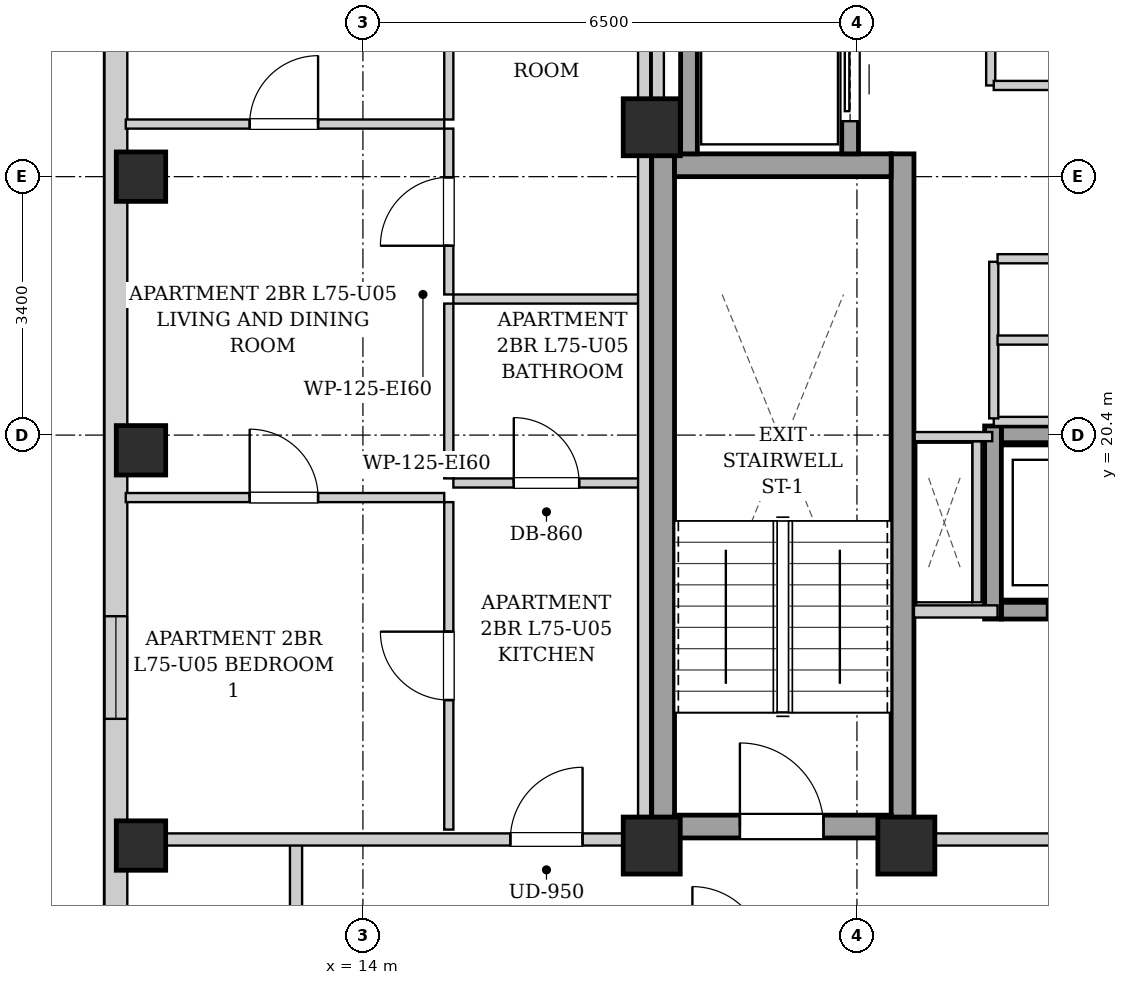
"""IFC4 building model, lengths in metres.
Left out: names, types, materials, properties, quantities, classifications, styles, units other than length and angle.
Written with IfcOpenShell. Run it as: python <this file> out.ifc"""

import sys

from ifc_helpers import new_model, si_unit, direction, frame, frame_2d, origin, origin_2d, place, context, subcontext, project, spatial, rectangle, extrude, element, fill, save


model = new_model("IFC4")
c1 = context("Model", 3, precision=1e-05, world=origin(), true_north=direction((0.0, 1.0)))
c2 = subcontext(c1, "Body", "Model", "MODEL_VIEW")
j1 = project(units=[si_unit("LENGTHUNIT", "METRE"), si_unit("PLANEANGLEUNIT", "RADIAN")], contexts=[c1])
p1 = place(None, origin())
s1 = spatial("IfcSite", under=j1, at=p1, CompositionType="ELEMENT")
p2 = place(p1, origin())
s2 = spatial("IfcBuilding", under=s1, at=p2, CompositionType="ELEMENT")
p3 = place(p2, frame((0.0, 0.0, 258.1)))
s3 = spatial("IfcBuildingStorey", under=s2, at=p3, CompositionType="ELEMENT", Elevation=258.1)
for number, where, z_axis, x_axis in (
    (1, (11.08, 15.0, 0.0), (0.0, 0.0, 1.0), (1.0, 0.0, 0.0)),
    (2, (11.08, 20.2, 0.0), (0.0, 0.0, 1.0), (1.0, 0.0, 0.0)),
    (3, (11.08, 23.8, 0.0), (0.0, 0.0, 1.0), (1.0, 0.0, 0.0)),
):
    element("IfcColumn", number, at=place(p3, frame(where, z_axis=z_axis, x_axis=x_axis)), inside=s3, PredefinedType="COLUMN", context=c2, shape_type="SweptSolid", body=[
        extrude(rectangle(XDim=0.65, YDim=0.65, at=origin_2d()), origin(), (0.0, 0.0, 1.0), 3.4),
    ])
for number, where, z_axis, x_axis in (
    (4, (17.8, 15.0, 0.0), (0.0, 0.0, 1.0), (1.0, 0.0, 0.0)),
    (5, (21.15, 15.0, 0.0), (0.0, 0.0, 1.0), (1.0, 0.0, 0.0)),
    (6, (17.8, 24.45, 0.0), (0.0, 0.0, 1.0), (1.0, 0.0, 0.0)),
):
    element("IfcColumn", number, at=place(p3, frame(where, z_axis=z_axis, x_axis=x_axis)), inside=s3, PredefinedType="COLUMN", context=c2, shape_type="SweptSolid", body=[
        extrude(rectangle(XDim=0.75, YDim=0.75, at=origin_2d()), origin(), (0.0, 0.0, 1.0), 3.4),
    ])
p4 = place(p3, frame((10.75, 6.3, 0.0), z_axis=(0.0, 0.0, 1.0), x_axis=(0.0, 1.0, 0.0)))
e7 = element("IfcWall", 7, at=p4, inside=s3, PredefinedType="SOLIDWALL", context=c2, shape_type="SweptSolid", body=[
    extrude(rectangle(XDim=31.4, YDim=0.3, at=frame_2d((15.7, 0.0))), origin(), (0.0, 0.0, 1.0), 3.05),
])
p5 = place(p4, frame((1.653, 0.0, 0.55)))
e8 = element("IfcOpeningElement", 8, at=p5, cuts=e7, PredefinedType="OPENING", context=c2, shape_type="SweptSolid", body=[
    extrude(rectangle(XDim=1.35, YDim=1.2, at=frame_2d((0.675, 0.6))), frame((0.0, 0.16, 0.0), z_axis=(0.0, -1.0, 0.0), x_axis=(1.0, 0.0, 0.0)), (0.0, 0.0, 1.0), 0.32),
])
p6 = place(p4, frame((10.367, 0.0, 0.55)))
e9 = element("IfcOpeningElement", 9, at=p6, cuts=e7, PredefinedType="OPENING", context=c2, shape_type="SweptSolid", body=[
    extrude(rectangle(XDim=1.35, YDim=1.2, at=frame_2d((0.675, 0.6))), frame((0.0, 0.16, 0.0), z_axis=(0.0, -1.0, 0.0), x_axis=(1.0, 0.0, 0.0)), (0.0, 0.0, 1.0), 0.32),
])
p7 = place(p4, frame((19.683, 0.0, 0.55)))
e10 = element("IfcOpeningElement", 10, at=p7, cuts=e7, PredefinedType="OPENING", context=c2, shape_type="SweptSolid", body=[
    extrude(rectangle(XDim=1.35, YDim=1.2, at=frame_2d((0.675, 0.6))), frame((0.0, 0.16, 0.0), z_axis=(0.0, -1.0, 0.0), x_axis=(1.0, 0.0, 0.0)), (0.0, 0.0, 1.0), 0.32),
])
for number, where, z_axis, x_axis in (
    (11, (17.95, 15.1, 0.0), (0.0, 0.0, 1.0), (0.0, 1.0, 0.0)),
    (12, (21.1, 15.1, 0.0), (0.0, 0.0, 1.0), (0.0, 1.0, 0.0)),
):
    element("IfcWall", number, at=place(p3, frame(where, z_axis=z_axis, x_axis=x_axis)), inside=s3, PredefinedType="SHEAR", context=c2, shape_type="SweptSolid", body=[
        extrude(rectangle(XDim=9.0, YDim=0.3, at=frame_2d((4.5, 0.0))), origin(), (0.0, 0.0, 1.0), 3.05),
    ])
p8 = place(p3, frame((18.1, 23.95, 0.0), z_axis=(0.0, 0.0, 1.0), x_axis=(1.0, 0.0, 0.0)))
e13 = element("IfcWall", 13, at=p8, inside=s3, PredefinedType="SHEAR", context=c2, shape_type="SweptSolid", body=[
    extrude(rectangle(XDim=2.85, YDim=0.3, at=frame_2d((1.425, 0.0))), origin(), (0.0, 0.0, 1.0), 3.05),
])
p9 = place(p3, frame((18.1, 15.25, 0.0), z_axis=(0.0, 0.0, 1.0), x_axis=(1.0, 0.0, 0.0)))
e14 = element("IfcWall", 14, at=p9, inside=s3, PredefinedType="SHEAR", context=c2, shape_type="SweptSolid", body=[
    extrude(rectangle(XDim=2.85, YDim=0.3, at=frame_2d((1.425, 0.0))), origin(), (0.0, 0.0, 1.0), 3.05),
])
p10 = place(p9, frame((0.86, 0.0, 0.0)))
e15 = element("IfcOpeningElement", 15, at=p10, cuts=e14, PredefinedType="OPENING", context=c2, shape_type="SweptSolid", body=[
    extrude(rectangle(XDim=1.1, YDim=2.05, at=frame_2d((0.55, 1.025))), frame((0.0, 0.16, 0.0), z_axis=(0.0, -1.0, 0.0), x_axis=(1.0, 0.0, 0.0)), (0.0, 0.0, 1.0), 0.32),
])
p11 = place(p3, frame((18.29, 24.1, 0.0), z_axis=(0.0, 0.0, 1.0), x_axis=(0.0, 1.0, 0.0)))
e16 = element("IfcWall", 16, at=p11, inside=s3, PredefinedType="SHEAR", context=c2, shape_type="SweptSolid", body=[
    extrude(rectangle(XDim=4.14, YDim=0.22, at=frame_2d((2.07, 0.0))), origin(), (0.0, 0.0, 1.0), 3.05),
])
p12 = place(p3, frame((20.41, 24.1, 0.0), z_axis=(0.0, 0.0, 1.0), x_axis=(0.0, 1.0, 0.0)))
e17 = element("IfcWall", 17, at=p12, inside=s3, PredefinedType="SHEAR", context=c2, shape_type="SweptSolid", body=[
    extrude(rectangle(XDim=1.96, YDim=0.22, at=frame_2d((0.98, 0.0))), origin(), (0.0, 0.0, 1.0), 3.05),
])
p13 = place(p12, frame((0.43, 0.0, 0.0)))
e18 = element("IfcOpeningElement", 18, at=p13, cuts=e17, PredefinedType="OPENING", context=c2, shape_type="SweptSolid", body=[
    extrude(rectangle(XDim=1.1, YDim=2.15, at=frame_2d((0.55, 1.075))), frame((0.0, 0.12, 0.0), z_axis=(0.0, -1.0, 0.0), x_axis=(1.0, 0.0, 0.0)), (0.0, 0.0, 1.0), 0.24),
])
p14 = place(p3, frame((22.4, 18.09, 0.0), z_axis=(0.0, 0.0, 1.0), x_axis=(1.0, 0.0, 0.0)))
e19 = element("IfcWall", 19, at=p14, inside=s3, PredefinedType="SHEAR", context=c2, shape_type="SweptSolid", body=[
    extrude(rectangle(XDim=2.4, YDim=0.22, at=frame_2d((1.2, 0.0))), origin(), (0.0, 0.0, 1.0), 3.05),
])
p15 = place(p14, frame((0.6, 0.0, 0.0)))
e20 = element("IfcOpeningElement", 20, at=p15, cuts=e19, PredefinedType="OPENING", context=c2, shape_type="SweptSolid", body=[
    extrude(rectangle(XDim=1.2, YDim=2.15, at=frame_2d((0.6, 1.075))), frame((0.0, 0.12, 0.0), z_axis=(0.0, -1.0, 0.0), x_axis=(1.0, 0.0, 0.0)), (0.0, 0.0, 1.0), 0.24),
])
p16 = place(p3, frame((22.4, 20.41, 0.0), z_axis=(0.0, 0.0, 1.0), x_axis=(1.0, 0.0, 0.0)))
e21 = element("IfcWall", 21, at=p16, inside=s3, PredefinedType="SHEAR", context=c2, shape_type="SweptSolid", body=[
    extrude(rectangle(XDim=2.4, YDim=0.22, at=frame_2d((1.2, 0.0))), origin(), (0.0, 0.0, 1.0), 3.05),
])
p17 = place(p3, frame((22.29, 17.98, 0.0), z_axis=(0.0, 0.0, 1.0), x_axis=(0.0, 1.0, 0.0)))
e22 = element("IfcWall", 22, at=p17, inside=s3, PredefinedType="SHEAR", context=c2, shape_type="SweptSolid", body=[
    extrude(rectangle(XDim=2.54, YDim=0.22, at=frame_2d((1.27, 0.0))), origin(), (0.0, 0.0, 1.0), 3.05),
])
p18 = place(p3, frame((21.25, 15.08, 0.0), z_axis=(0.0, 0.0, 1.0), x_axis=(1.0, 0.0, 0.0)))
e23 = element("IfcWall", 23, at=p18, inside=s3, PredefinedType="PARTITIONING", context=c2, shape_type="SweptSolid", body=[
    extrude(rectangle(XDim=8.5, YDim=0.16, at=frame_2d((4.25, 0.0))), origin(), (0.0, 0.0, 1.0), 2.578),
])
p19 = place(p18, frame((3.725, 0.0, 0.0)))
e24 = element("IfcOpeningElement", 24, at=p19, cuts=e23, PredefinedType="OPENING", context=c2, shape_type="SweptSolid", body=[
    extrude(rectangle(XDim=1.05, YDim=2.05, at=frame_2d((0.525, 1.025))), frame((0.0, 0.09, 0.0), z_axis=(0.0, -1.0, 0.0), x_axis=(1.0, 0.0, 0.0)), (0.0, 0.0, 1.0), 0.18),
])
p20 = place(p3, frame((21.25, 18.08, 0.0), z_axis=(0.0, 0.0, 1.0), x_axis=(1.0, 0.0, 0.0)))
e25 = element("IfcWall", 25, at=p20, inside=s3, PredefinedType="PARTITIONING", context=c2, shape_type="SweptSolid", body=[
    extrude(rectangle(XDim=1.1, YDim=0.16, at=frame_2d((0.55, 0.0))), origin(), (0.0, 0.0, 1.0), 3.05),
])
p21 = place(p3, frame((17.88, 24.12, 0.0), z_axis=(0.0, 0.0, 1.0), x_axis=(0.0, 1.0, 0.0)))
e26 = element("IfcWall", 26, at=p21, inside=s3, PredefinedType="PARTITIONING", context=c2, shape_type="SweptSolid", body=[
    extrude(rectangle(XDim=4.76, YDim=0.16, at=frame_2d((2.38, 0.0))), origin(), (0.0, 0.0, 1.0), 2.385),
])
p22 = place(p3, frame((22.08, 18.2, 0.0), z_axis=(0.0, 0.0, 1.0), x_axis=(0.0, 1.0, 0.0)))
e27 = element("IfcWall", 27, at=p22, inside=s3, PredefinedType="PARTITIONING", context=c2, shape_type="SweptSolid", body=[
    extrude(rectangle(XDim=2.12, YDim=0.12, at=frame_2d((1.06, 0.0))), origin(), (0.0, 0.0, 1.0), 3.05),
])
p23 = place(p3, frame((22.28, 20.38, 0.0), z_axis=(0.0, 0.0, 1.0), x_axis=(-1.0, 0.0, 0.0)))
e28 = element("IfcWall", 28, at=p23, inside=s3, PredefinedType="PARTITIONING", context=c2, shape_type="SweptSolid", body=[
    extrude(rectangle(XDim=1.02, YDim=0.12, at=frame_2d((0.51, 0.0))), origin(), (0.0, 0.0, 1.0), 3.05),
])
p24 = place(p3, frame((22.26, 25.0, 0.0), z_axis=(0.0, 0.0, 1.0), x_axis=(0.0, 1.0, 0.0)))
e29 = element("IfcWall", 29, at=p24, inside=s3, PredefinedType="PARTITIONING", context=c2, shape_type="SweptSolid", body=[
    extrude(rectangle(XDim=3.86, YDim=0.12, at=frame_2d((1.93, 0.0))), origin(), (0.0, 0.0, 1.0), 3.05),
])
p25 = place(p3, frame((22.3, 25.0, 0.0), z_axis=(0.0, 0.0, 1.0), x_axis=(1.0, 0.0, 0.0)))
e30 = element("IfcWall", 30, at=p25, inside=s3, PredefinedType="PARTITIONING", context=c2, shape_type="SweptSolid", body=[
    extrude(rectangle(XDim=2.04, YDim=0.12, at=frame_2d((1.02, 0.0))), origin(), (0.0, 0.0, 1.0), 3.05),
])
p26 = place(p3, frame((22.3, 20.58, 0.0), z_axis=(0.0, 0.0, 1.0), x_axis=(1.0, 0.0, 0.0)))
e31 = element("IfcWall", 31, at=p26, inside=s3, PredefinedType="PARTITIONING", context=c2, shape_type="SweptSolid", body=[
    extrude(rectangle(XDim=7.35, YDim=0.12, at=frame_2d((3.675, 0.0))), origin(), (0.0, 0.0, 1.0), 3.05),
])
p27 = place(p3, frame((22.3, 20.62, 0.0), z_axis=(0.0, 0.0, 1.0), x_axis=(0.0, 1.0, 0.0)))
e32 = element("IfcWall", 32, at=p27, inside=s3, PredefinedType="PARTITIONING", context=c2, shape_type="SweptSolid", body=[
    extrude(rectangle(XDim=2.06, YDim=0.12, at=frame_2d((1.03, 0.0))), origin(), (0.0, 0.0, 1.0), 3.05),
])
p28 = place(p3, frame((22.35, 21.65, 0.0), z_axis=(0.0, 0.0, 1.0), x_axis=(1.0, 0.0, 0.0)))
e33 = element("IfcWall", 33, at=p28, inside=s3, PredefinedType="PARTITIONING", context=c2, shape_type="SweptSolid", body=[
    extrude(rectangle(XDim=5.79, YDim=0.12, at=frame_2d((2.895, 0.0))), origin(), (0.0, 0.0, 1.0), 3.05),
])
p29 = place(p3, frame((22.35, 22.72, 0.0), z_axis=(0.0, 0.0, 1.0), x_axis=(1.0, 0.0, 0.0)))
e34 = element("IfcWall", 34, at=p29, inside=s3, PredefinedType="PARTITIONING", context=c2, shape_type="SweptSolid", body=[
    extrude(rectangle(XDim=7.27, YDim=0.12, at=frame_2d((3.635, 0.0))), origin(), (0.0, 0.0, 1.0), 3.05),
])
p30 = place(p29, frame((2.57, 0.0, 0.0)))
e35 = element("IfcOpeningElement", 35, at=p30, cuts=e34, PredefinedType="OPENING", context=c2, shape_type="SweptSolid", body=[
    extrude(rectangle(XDim=0.86, YDim=2.05, at=frame_2d((0.43, 1.025))), frame((0.0, 0.07, 0.0), z_axis=(0.0, -1.0, 0.0), x_axis=(1.0, 0.0, 0.0)), (0.0, 0.0, 1.0), 0.14),
])
p31 = place(p29, frame((6.06, 0.0, 0.0)))
e36 = element("IfcOpeningElement", 36, at=p31, cuts=e34, PredefinedType="OPENING", context=c2, shape_type="SweptSolid", body=[
    extrude(rectangle(XDim=0.86, YDim=2.05, at=frame_2d((0.43, 1.025))), frame((0.0, 0.07, 0.0), z_axis=(0.0, -1.0, 0.0), x_axis=(1.0, 0.0, 0.0)), (0.0, 0.0, 1.0), 0.14),
])
p32 = place(p3, frame((13.12, 13.51, 0.0), z_axis=(0.0, 0.0, 1.0), x_axis=(0.0, 1.0, 0.0)))
e37 = element("IfcWall", 37, at=p32, inside=s3, PredefinedType="PARTITIONING", context=c2, shape_type="SweptSolid", body=[
    extrude(rectangle(XDim=1.58, YDim=0.16, at=frame_2d((0.79, 0.0))), origin(), (0.0, 0.0, 1.0), 3.05),
])
p33 = place(p3, frame((10.88, 15.08, 0.0), z_axis=(0.0, 0.0, 1.0), x_axis=(1.0, 0.0, 0.0)))
e38 = element("IfcWall", 38, at=p33, inside=s3, PredefinedType="PARTITIONING", context=c2, shape_type="SweptSolid", body=[
    extrude(rectangle(XDim=6.88, YDim=0.16, at=frame_2d((3.44, 0.0))), origin(), (0.0, 0.0, 1.0), 2.578),
])
p34 = place(p33, frame((5.06, 0.0, 0.0)))
e39 = element("IfcOpeningElement", 39, at=p34, cuts=e38, PredefinedType="OPENING", context=c2, shape_type="SweptSolid", body=[
    extrude(rectangle(XDim=0.95, YDim=2.1, at=frame_2d((0.475, 1.05))), frame((0.0, 0.09, 0.0), z_axis=(0.0, -1.0, 0.0), x_axis=(1.0, 0.0, 0.0)), (0.0, 0.0, 1.0), 0.18),
])
p35 = place(p3, frame((15.19, 22.19, 0.0), z_axis=(0.0, 0.0, 1.0), x_axis=(1.0, 0.0, 0.0)))
e40 = element("IfcWall", 40, at=p35, inside=s3, PredefinedType="PARTITIONING", context=c2, shape_type="SweptSolid", body=[
    extrude(rectangle(XDim=2.45, YDim=0.12, at=frame_2d((1.225, 0.0))), origin(), (0.0, 0.0, 1.0), 3.05),
])
p36 = place(p3, frame((15.13, 22.25, 0.0), z_axis=(0.0, 0.0, 1.0), x_axis=(0.0, 1.0, 0.0)))
e41 = element("IfcWall", 41, at=p36, inside=s3, PredefinedType="PARTITIONING", context=c2, shape_type="SweptSolid", body=[
    extrude(rectangle(XDim=2.182, YDim=0.12, at=frame_2d((1.091, 0.0))), origin(), (0.0, 0.0, 1.0), 3.05),
])
p37 = place(p36, frame((0.641, 0.0, 0.0)))
e42 = element("IfcOpeningElement", 42, at=p37, cuts=e41, PredefinedType="OPENING", context=c2, shape_type="SweptSolid", body=[
    extrude(rectangle(XDim=0.9, YDim=2.05, at=frame_2d((0.45, 1.025))), frame((0.0, 0.07, 0.0), z_axis=(0.0, -1.0, 0.0), x_axis=(1.0, 0.0, 0.0)), (0.0, 0.0, 1.0), 0.14),
])
p38 = place(p3, frame((15.13, 24.552, 0.0), z_axis=(0.0, 0.0, 1.0), x_axis=(0.0, 1.0, 0.0)))
e43 = element("IfcWall", 43, at=p38, inside=s3, PredefinedType="PARTITIONING", context=c2, shape_type="SweptSolid", body=[
    extrude(rectangle(XDim=4.308, YDim=0.12, at=frame_2d((2.154, 0.0))), origin(), (0.0, 0.0, 1.0), 3.05),
])
p39 = place(p38, frame((1.704, 0.0, 0.0)))
e44 = element("IfcOpeningElement", 44, at=p39, cuts=e43, PredefinedType="OPENING", context=c2, shape_type="SweptSolid", body=[
    extrude(rectangle(XDim=0.9, YDim=2.05, at=frame_2d((0.45, 1.025))), frame((0.0, 0.07, 0.0), z_axis=(0.0, -1.0, 0.0), x_axis=(1.0, 0.0, 0.0)), (0.0, 0.0, 1.0), 0.14),
])
p40 = place(p3, frame((15.19, 19.77, 0.0), z_axis=(0.0, 0.0, 1.0), x_axis=(1.0, 0.0, 0.0)))
e45 = element("IfcWall", 45, at=p40, inside=s3, PredefinedType="PARTITIONING", context=c2, shape_type="SweptSolid", body=[
    extrude(rectangle(XDim=2.45, YDim=0.12, at=frame_2d((1.225, 0.0))), origin(), (0.0, 0.0, 1.0), 3.05),
])
p41 = place(p40, frame((0.795, 0.0, 0.0)))
e46 = element("IfcOpeningElement", 46, at=p41, cuts=e45, PredefinedType="OPENING", context=c2, shape_type="SweptSolid", body=[
    extrude(rectangle(XDim=0.86, YDim=2.05, at=frame_2d((0.43, 1.025))), frame((0.0, 0.07, 0.0), z_axis=(0.0, -1.0, 0.0), x_axis=(1.0, 0.0, 0.0)), (0.0, 0.0, 1.0), 0.14),
])
p42 = place(p3, frame((15.13, 19.83, 0.0), z_axis=(0.0, 0.0, 1.0), x_axis=(0.0, 1.0, 0.0)))
e47 = element("IfcWall", 47, at=p42, inside=s3, PredefinedType="PARTITIONING", context=c2, shape_type="SweptSolid", body=[
    extrude(rectangle(XDim=2.3, YDim=0.12, at=frame_2d((1.15, 0.0))), origin(), (0.0, 0.0, 1.0), 3.05),
])
p43 = place(p3, frame((15.13, 15.21, 0.0), z_axis=(0.0, 0.0, 1.0), x_axis=(0.0, 1.0, 0.0)))
e48 = element("IfcWall", 48, at=p43, inside=s3, PredefinedType="PARTITIONING", context=c2, shape_type="SweptSolid", body=[
    extrude(rectangle(XDim=4.308, YDim=0.12, at=frame_2d((2.154, 0.0))), origin(), (0.0, 0.0, 1.0), 3.05),
])
p44 = place(p43, frame((1.704, 0.0, 0.0)))
e49 = element("IfcOpeningElement", 49, at=p44, cuts=e48, PredefinedType="OPENING", context=c2, shape_type="SweptSolid", body=[
    extrude(rectangle(XDim=0.9, YDim=2.05, at=frame_2d((0.45, 1.025))), frame((0.0, 0.07, 0.0), z_axis=(0.0, -1.0, 0.0), x_axis=(1.0, 0.0, 0.0)), (0.0, 0.0, 1.0), 0.14),
])
p45 = place(p3, frame((10.88, 19.578, 0.0), z_axis=(0.0, 0.0, 1.0), x_axis=(1.0, 0.0, 0.0)))
e50 = element("IfcWall", 50, at=p45, inside=s3, PredefinedType="PARTITIONING", context=c2, shape_type="SweptSolid", body=[
    extrude(rectangle(XDim=4.19, YDim=0.12, at=frame_2d((2.095, 0.0))), origin(), (0.0, 0.0, 1.0), 3.05),
])
p46 = place(p45, frame((1.63, 0.0, 0.0)))
e51 = element("IfcOpeningElement", 51, at=p46, cuts=e50, PredefinedType="OPENING", context=c2, shape_type="SweptSolid", body=[
    extrude(rectangle(XDim=0.9, YDim=2.05, at=frame_2d((0.45, 1.025))), frame((0.0, 0.07, 0.0), z_axis=(0.0, -1.0, 0.0), x_axis=(1.0, 0.0, 0.0)), (0.0, 0.0, 1.0), 0.14),
])
p47 = place(p3, frame((10.88, 24.492, 0.0), z_axis=(0.0, 0.0, 1.0), x_axis=(1.0, 0.0, 0.0)))
e52 = element("IfcWall", 52, at=p47, inside=s3, PredefinedType="PARTITIONING", context=c2, shape_type="SweptSolid", body=[
    extrude(rectangle(XDim=4.19, YDim=0.12, at=frame_2d((2.095, 0.0))), origin(), (0.0, 0.0, 1.0), 2.788),
])
p48 = place(p47, frame((1.63, 0.0, 0.0)))
e53 = element("IfcOpeningElement", 53, at=p48, cuts=e52, PredefinedType="OPENING", context=c2, shape_type="SweptSolid", body=[
    extrude(rectangle(XDim=0.9, YDim=2.05, at=frame_2d((0.45, 1.025))), frame((0.0, 0.07, 0.0), z_axis=(0.0, -1.0, 0.0), x_axis=(1.0, 0.0, 0.0)), (0.0, 0.0, 1.0), 0.14),
])
p49 = place(p3, frame((17.7, 15.02, 0.0), z_axis=(0.0, 0.0, 1.0), x_axis=(0.0, 1.0, 0.0)))
e54 = element("IfcWall", 54, at=p49, inside=s3, PredefinedType="PARTITIONING", context=c2, shape_type="SweptSolid", body=[
    extrude(rectangle(XDim=13.98, YDim=0.16, at=frame_2d((6.99, 0.0))), origin(), (0.0, 0.0, 1.0), 2.385),
])
p50 = place(p10, origin())
e55 = element("IfcDoor", 55, at=p50, inside=s3, OperationType="SINGLE_SWING_LEFT", PredefinedType="DOOR", context=c2, shape_type="SweptSolid", body=[
    extrude(rectangle(XDim=1.1, YDim=2.05, at=frame_2d((0.55, 1.025))), frame((0.0, 0.025, 0.0), z_axis=(0.0, -1.0, 0.0), x_axis=(1.0, 0.0, 0.0)), (0.0, 0.0, 1.0), 0.05),
])
fill(e15, e55)
p51 = place(p13, origin())
e56 = element("IfcDoor", 56, at=p51, inside=s3, OperationType="SLIDING_TO_LEFT", PredefinedType="DOOR", context=c2, shape_type="SweptSolid", body=[
    extrude(rectangle(XDim=1.1, YDim=2.15, at=frame_2d((0.55, 1.075))), frame((0.0, 0.025, 0.0), z_axis=(0.0, -1.0, 0.0), x_axis=(1.0, 0.0, 0.0)), (0.0, 0.0, 1.0), 0.05),
])
fill(e18, e56)
p52 = place(p15, origin())
e57 = element("IfcDoor", 57, at=p52, inside=s3, OperationType="SLIDING_TO_LEFT", PredefinedType="DOOR", context=c2, shape_type="SweptSolid", body=[
    extrude(rectangle(XDim=1.2, YDim=2.15, at=frame_2d((0.6, 1.075))), frame((0.0, 0.025, 0.0), z_axis=(0.0, -1.0, 0.0), x_axis=(1.0, 0.0, 0.0)), (0.0, 0.0, 1.0), 0.05),
])
fill(e20, e57)
p53 = place(p34, origin())
e58 = element("IfcDoor", 58, at=p53, inside=s3, OperationType="SINGLE_SWING_RIGHT", PredefinedType="DOOR", context=c2, shape_type="SweptSolid", body=[
    extrude(rectangle(XDim=0.95, YDim=2.1, at=frame_2d((0.475, 1.05))), frame((0.0, 0.025, 0.0), z_axis=(0.0, -1.0, 0.0), x_axis=(1.0, 0.0, 0.0)), (0.0, 0.0, 1.0), 0.05),
])
fill(e39, e58)
p54 = place(p37, origin())
e59 = element("IfcDoor", 59, at=p54, inside=s3, OperationType="SINGLE_SWING_LEFT", PredefinedType="DOOR", context=c2, shape_type="SweptSolid", body=[
    extrude(rectangle(XDim=0.9, YDim=2.05, at=frame_2d((0.45, 1.025))), frame((0.0, 0.025, 0.0), z_axis=(0.0, -1.0, 0.0), x_axis=(1.0, 0.0, 0.0)), (0.0, 0.0, 1.0), 0.05),
])
fill(e42, e59)
p55 = place(p41, origin())
e60 = element("IfcDoor", 60, at=p55, inside=s3, OperationType="SINGLE_SWING_LEFT", PredefinedType="DOOR", context=c2, shape_type="SweptSolid", body=[
    extrude(rectangle(XDim=0.86, YDim=2.05, at=frame_2d((0.43, 1.025))), frame((0.0, 0.025, 0.0), z_axis=(0.0, -1.0, 0.0), x_axis=(1.0, 0.0, 0.0)), (0.0, 0.0, 1.0), 0.05),
])
fill(e46, e60)
p56 = place(p44, origin())
e61 = element("IfcDoor", 61, at=p56, inside=s3, OperationType="SINGLE_SWING_RIGHT", PredefinedType="DOOR", context=c2, shape_type="SweptSolid", body=[
    extrude(rectangle(XDim=0.9, YDim=2.05, at=frame_2d((0.45, 1.025))), frame((0.0, 0.025, 0.0), z_axis=(0.0, -1.0, 0.0), x_axis=(1.0, 0.0, 0.0)), (0.0, 0.0, 1.0), 0.05),
])
fill(e49, e61)
p57 = place(p46, origin())
e62 = element("IfcDoor", 62, at=p57, inside=s3, OperationType="SINGLE_SWING_LEFT", PredefinedType="DOOR", context=c2, shape_type="SweptSolid", body=[
    extrude(rectangle(XDim=0.9, YDim=2.05, at=frame_2d((0.45, 1.025))), frame((0.0, 0.025, 0.0), z_axis=(0.0, -1.0, 0.0), x_axis=(1.0, 0.0, 0.0)), (0.0, 0.0, 1.0), 0.05),
])
fill(e51, e62)
p58 = place(p48, origin())
e63 = element("IfcDoor", 63, at=p58, inside=s3, OperationType="SINGLE_SWING_RIGHT", PredefinedType="DOOR", context=c2, shape_type="SweptSolid", body=[
    extrude(rectangle(XDim=0.9, YDim=2.05, at=frame_2d((0.45, 1.025))), frame((0.0, 0.025, 0.0), z_axis=(0.0, -1.0, 0.0), x_axis=(1.0, 0.0, 0.0)), (0.0, 0.0, 1.0), 0.05),
])
fill(e53, e63)
p59 = place(p6, origin())
e64 = element("IfcWindow", 64, at=p59, inside=s3, PartitioningType="SINGLE_PANEL", PredefinedType="WINDOW", context=c2, shape_type="SweptSolid", body=[
    extrude(rectangle(XDim=1.35, YDim=1.2, at=frame_2d((0.675, 0.6))), frame((0.0, 0.03, 0.0), z_axis=(0.0, -1.0, 0.0), x_axis=(1.0, 0.0, 0.0)), (0.0, 0.0, 1.0), 0.06),
])
fill(e9, e64)
save(model, sys.argv[1])
